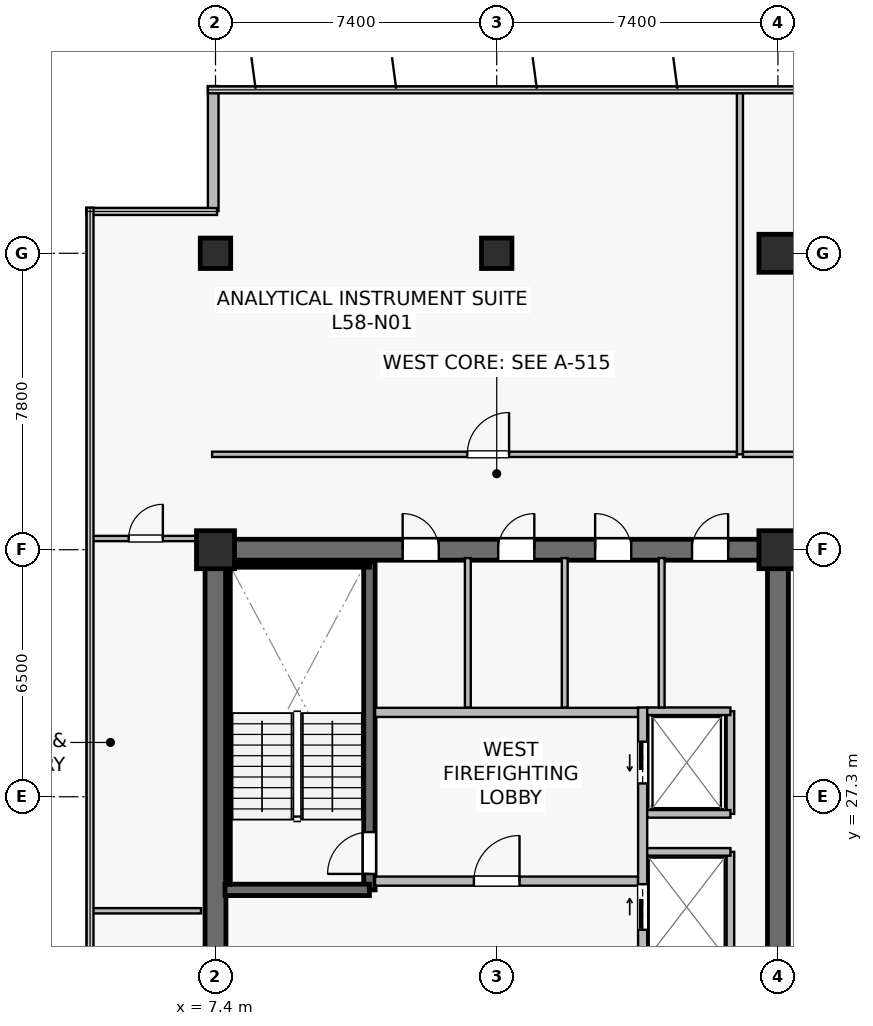
"""IFC4 building model, lengths in metres.
Left out: names, types, materials, properties, quantities, classifications, styles, units other than length and angle.
Written with IfcOpenShell. Run it as: python <this file> out.ifc"""

import sys

from ifc_helpers import new_model, si_unit, direction, frame, frame_2d, origin, origin_2d, place, context, subcontext, project, spatial, rectangle, extrude, source, transform, mapped, element, fill, save


model = new_model("IFC4")
c1 = context("Model", 3, precision=1e-05, world=origin(), true_north=direction((0.0, 1.0)))
c2 = subcontext(c1, "Body", "Model", "MODEL_VIEW")
j1 = project(units=[si_unit("LENGTHUNIT", "METRE"), si_unit("PLANEANGLEUNIT", "RADIAN")], contexts=[c1])
p1 = place(None, origin())
s1 = spatial("IfcSite", under=j1, at=p1, CompositionType="ELEMENT")
p2 = place(p1, origin())
s2 = spatial("IfcBuilding", under=s1, at=p2, CompositionType="ELEMENT")
p3 = place(p2, frame((0.0, 0.0, 242.4)))
s3 = spatial("IfcBuildingStorey", under=s2, at=p3, CompositionType="ELEMENT", Elevation=242.4)
p4 = place(p3, frame((7.125, 33.8, 0.0), z_axis=(0.0, 0.0, 1.0), x_axis=(1.0, 0.0, 0.0)))
e1 = element("IfcWall", 1, at=p4, inside=s3, PredefinedType="SHEAR", context=c2, shape_type="SweptSolid", body=[
    extrude(rectangle(XDim=15.35, YDim=0.55, at=frame_2d((7.675, 0.0))), origin(), (0.0, 0.0, 1.0), 3.8),
])
p5 = place(p4, frame((5.2, 0.0, 0.0)))
e2 = element("IfcOpeningElement", 2, at=p5, cuts=e1, PredefinedType="OPENING", context=c2, shape_type="SweptSolid", body=[
    extrude(rectangle(XDim=0.95, YDim=2.15, at=frame_2d((0.475, 1.075))), frame((0.0, 0.285, 0.0), z_axis=(0.0, -1.0, 0.0), x_axis=(1.0, 0.0, 0.0)), (0.0, 0.0, 1.0), 0.57),
])
p6 = place(p4, frame((7.715, 0.0, 0.0)))
e3 = element("IfcOpeningElement", 3, at=p6, cuts=e1, PredefinedType="OPENING", context=c2, shape_type="SweptSolid", body=[
    extrude(rectangle(XDim=0.95, YDim=2.15, at=frame_2d((0.475, 1.075))), frame((0.0, 0.285, 0.0), z_axis=(0.0, -1.0, 0.0), x_axis=(1.0, 0.0, 0.0)), (0.0, 0.0, 1.0), 0.57),
])
p7 = place(p4, frame((10.265, 0.0, 0.0)))
e4 = element("IfcOpeningElement", 4, at=p7, cuts=e1, PredefinedType="OPENING", context=c2, shape_type="SweptSolid", body=[
    extrude(rectangle(XDim=0.95, YDim=2.15, at=frame_2d((0.475, 1.075))), frame((0.0, 0.285, 0.0), z_axis=(0.0, -1.0, 0.0), x_axis=(1.0, 0.0, 0.0)), (0.0, 0.0, 1.0), 0.57),
])
p8 = place(p4, frame((12.815, 0.0, 0.0)))
e5 = element("IfcOpeningElement", 5, at=p8, cuts=e1, PredefinedType="OPENING", context=c2, shape_type="SweptSolid", body=[
    extrude(rectangle(XDim=0.95, YDim=2.15, at=frame_2d((0.475, 1.075))), frame((0.0, 0.285, 0.0), z_axis=(0.0, -1.0, 0.0), x_axis=(1.0, 0.0, 0.0)), (0.0, 0.0, 1.0), 0.57),
])
p9 = place(p3, frame((7.4, 15.075, 0.0), z_axis=(0.0, 0.0, 1.0), x_axis=(0.0, 1.0, 0.0)))
e6 = element("IfcWall", 6, at=p9, inside=s3, PredefinedType="SHEAR", context=c2, shape_type="SweptSolid", body=[
    extrude(rectangle(XDim=18.45, YDim=0.55, at=frame_2d((9.225, 0.0))), origin(), (0.0, 0.0, 1.0), 3.8),
])
p10 = place(p3, frame((22.2, 15.075, 0.0), z_axis=(0.0, 0.0, 1.0), x_axis=(0.0, 1.0, 0.0)))
e7 = element("IfcWall", 7, at=p10, inside=s3, PredefinedType="SHEAR", context=c2, shape_type="SweptSolid", body=[
    extrude(rectangle(XDim=18.45, YDim=0.55, at=frame_2d((9.225, 0.0))), origin(), (0.0, 0.0, 1.0), 3.8),
])
p11 = place(p10, frame((3.475, 0.0, 0.0)))
e8 = element("IfcOpeningElement", 8, at=p11, cuts=e7, PredefinedType="OPENING", context=c2, shape_type="SweptSolid", body=[
    extrude(rectangle(XDim=1.42, YDim=2.2, at=frame_2d((0.71, 1.1))), frame((0.0, 0.285, 0.0), z_axis=(0.0, -1.0, 0.0), x_axis=(1.0, 0.0, 0.0)), (0.0, 0.0, 1.0), 0.57),
])
p12 = place(p3, frame((11.45, 24.85, 0.0), z_axis=(0.0, 0.0, 1.0), x_axis=(0.0, 1.0, 0.0)))
e9 = element("IfcWall", 9, at=p12, inside=s3, PredefinedType="SHEAR", context=c2, shape_type="SweptSolid", body=[
    extrude(rectangle(XDim=8.63, YDim=0.3, at=frame_2d((4.315, 0.0))), origin(), (0.0, 0.0, 1.0), 3.8),
])
p13 = place(p12, frame((0.42, 0.0, 0.0)))
e10 = element("IfcOpeningElement", 10, at=p13, cuts=e9, PredefinedType="OPENING", context=c2, shape_type="SweptSolid", body=[
    extrude(rectangle(XDim=1.1, YDim=2.15, at=frame_2d((0.55, 1.075))), frame((0.0, 0.16, 0.0), z_axis=(0.0, -1.0, 0.0), x_axis=(1.0, 0.0, 0.0)), (0.0, 0.0, 1.0), 0.32),
])
p14 = place(p3, frame((7.65, 24.85, 0.0), z_axis=(0.0, 0.0, 1.0), x_axis=(1.0, 0.0, 0.0)))
e11 = element("IfcWall", 11, at=p14, inside=s3, PredefinedType="SHEAR", context=c2, shape_type="SweptSolid", body=[
    extrude(rectangle(XDim=3.8, YDim=0.3, at=frame_2d((1.9, 0.0))), origin(), (0.0, 0.0, 1.0), 3.8),
])
p15 = place(p3, frame((7.73, 33.4, 0.0), z_axis=(0.0, 0.0, 1.0), x_axis=(1.0, 0.0, 0.0)))
e12 = element("IfcWall", 12, at=p15, inside=s3, PredefinedType="SOLIDWALL", context=c2, shape_type="SweptSolid", body=[
    extrude(rectangle(XDim=3.72, YDim=0.12, at=frame_2d((1.86, 0.0))), origin(), (0.0, 0.0, 1.0), 3.8),
])
p16 = place(p3, frame((7.73, 25.0, 0.0), z_axis=(0.0, 0.0, 1.0), x_axis=(0.0, 1.0, 0.0)))
e13 = element("IfcWall", 13, at=p16, inside=s3, PredefinedType="SOLIDWALL", context=c2, shape_type="SweptSolid", body=[
    extrude(rectangle(XDim=8.32, YDim=0.12, at=frame_2d((4.16, 0.0))), origin(), (0.0, 0.0, 1.0), 3.8),
])
m1 = source(origin(), c2, "Body", "SweptSolid", [
    extrude(rectangle(XDim=1.0, YDim=1.0, at=origin_2d()), origin(), (0.0, 0.0, 1.0), 4.1),
])
for number, where, z_axis, x_axis in (
    (14, (7.4, 33.8, 0.0), (0.0, 0.0, 1.0), (1.0, 0.0, 0.0)),
    (15, (22.2, 33.8, 0.0), (0.0, 0.0, 1.0), (1.0, 0.0, 0.0)),
):
    element("IfcColumn", number, at=place(p3, frame(where, z_axis=z_axis, x_axis=x_axis)), inside=s3, PredefinedType="COLUMN", context=c2, shape_type="MappedRepresentation", body=[
        mapped(m1, transform((0.0, 0.0, 0.0), scale=1.0)),
    ])
m2 = source(origin(), c2, "Body", "SweptSolid", [
    extrude(rectangle(XDim=0.8, YDim=0.8, at=origin_2d()), origin(), (0.0, 0.0, 1.0), 4.1),
])
p17 = place(p3, frame((14.8, 41.6, 0.0), z_axis=(0.0, 0.0, 1.0), x_axis=(1.0, 0.0, 0.0)))
e16 = element("IfcColumn", 16, at=p17, inside=s3, PredefinedType="COLUMN", context=c2, shape_type="MappedRepresentation", body=[
    mapped(m2, transform((0.0, 0.0, 0.0), scale=1.0)),
])
p18 = place(p3, frame((22.2, 41.6, 0.0), z_axis=(0.0, 0.0, 1.0), x_axis=(1.0, 0.0, 0.0)))
e17 = element("IfcColumn", 17, at=p18, inside=s3, PredefinedType="COLUMN", context=c2, shape_type="MappedRepresentation", body=[
    mapped(m1, transform((0.0, 0.0, 0.0), scale=1.0)),
])
p19 = place(p3, frame((7.4, 41.6, 0.0), z_axis=(0.0, 0.0, 1.0), x_axis=(1.0, 0.0, 0.0)))
e18 = element("IfcColumn", 18, at=p19, inside=s3, PredefinedType="COLUMN", context=c2, shape_type="MappedRepresentation", body=[
    mapped(m2, transform((0.0, 0.0, 0.0), scale=1.0)),
])
p20 = place(p3, frame((7.34, 46.0, 0.0), z_axis=(0.0, 0.0, 1.0), x_axis=(0.0, -1.0, 0.0)))
e19 = element("IfcWall", 19, at=p20, inside=s3, PredefinedType="STANDARD", context=c2, shape_type="SweptSolid", body=[
    extrude(rectangle(XDim=3.288, YDim=0.28, at=frame_2d((1.644, 0.0))), origin(), (0.0, 0.0, 1.0), 3.8),
])
p21 = place(p3, frame((11.6, 25.08, 0.0), z_axis=(0.0, 0.0, 1.0), x_axis=(1.0, 0.0, 0.0)))
e20 = element("IfcWall", 20, at=p21, inside=s3, PredefinedType="SOLIDWALL", context=c2, shape_type="SweptSolid", body=[
    extrude(rectangle(XDim=6.92, YDim=0.24, at=frame_2d((3.46, 0.0))), origin(), (0.0, 0.0, 1.0), 3.197),
])
p22 = place(p21, frame((2.6, 0.0, 0.0)))
e21 = element("IfcOpeningElement", 21, at=p22, cuts=e20, PredefinedType="OPENING", context=c2, shape_type="SweptSolid", body=[
    extrude(rectangle(XDim=1.2, YDim=2.16, at=frame_2d((0.6, 1.08))), frame((0.0, 0.13, 0.0), z_axis=(0.0, -1.0, 0.0), x_axis=(1.0, 0.0, 0.0)), (0.0, 0.0, 1.0), 0.26),
])
p23 = place(p3, frame((11.6, 29.52, 0.0), z_axis=(0.0, 0.0, 1.0), x_axis=(1.0, 0.0, 0.0)))
e22 = element("IfcWall", 22, at=p23, inside=s3, PredefinedType="SOLIDWALL", context=c2, shape_type="SweptSolid", body=[
    extrude(rectangle(XDim=6.92, YDim=0.24, at=frame_2d((3.46, 0.0))), origin(), (0.0, 0.0, 1.0), 3.197),
])
p24 = place(p3, frame((18.64, 22.8, 0.0), z_axis=(0.0, 0.0, 1.0), x_axis=(0.0, 1.0, 0.0)))
e23 = element("IfcWall", 23, at=p24, inside=s3, PredefinedType="SOLIDWALL", context=c2, shape_type="SweptSolid", body=[
    extrude(rectangle(XDim=6.85, YDim=0.24, at=frame_2d((3.425, 0.0))), origin(), (0.0, 0.0, 1.0), 2.935),
])
p25 = place(p24, frame((4.85, 0.0, 0.0)))
e24 = element("IfcOpeningElement", 24, at=p25, cuts=e23, PredefinedType="OPENING", context=c2, shape_type="SweptSolid", body=[
    extrude(rectangle(XDim=1.1, YDim=2.22, at=frame_2d((0.55, 1.11))), frame((0.0, 0.13, 0.0), z_axis=(0.0, -1.0, 0.0), x_axis=(1.0, 0.0, 0.0)), (0.0, 0.0, 1.0), 0.26),
])
p26 = place(p24, frame((1.0, 0.0, 0.0)))
e25 = element("IfcOpeningElement", 25, at=p26, cuts=e23, PredefinedType="OPENING", context=c2, shape_type="SweptSolid", body=[
    extrude(rectangle(XDim=1.2, YDim=2.22, at=frame_2d((0.6, 1.11))), frame((0.0, 0.13, 0.0), z_axis=(0.0, -1.0, 0.0), x_axis=(1.0, 0.0, 0.0)), (0.0, 0.0, 1.0), 0.26),
])
p27 = place(p3, frame((20.95, 26.85, 0.0), z_axis=(0.0, 0.0, 1.0), x_axis=(0.0, 1.0, 0.0)))
e26 = element("IfcWall", 26, at=p27, inside=s3, PredefinedType="SOLIDWALL", context=c2, shape_type="SweptSolid", body=[
    extrude(rectangle(XDim=2.7, YDim=0.2, at=frame_2d((1.35, 0.0))), origin(), (0.0, 0.0, 1.0), 3.8),
])
p28 = place(p3, frame((18.76, 29.55, 0.0), z_axis=(0.0, 0.0, 1.0), x_axis=(1.0, 0.0, 0.0)))
e27 = element("IfcWall", 27, at=p28, inside=s3, PredefinedType="SOLIDWALL", context=c2, shape_type="SweptSolid", body=[
    extrude(rectangle(XDim=2.19, YDim=0.2, at=frame_2d((1.095, 0.0))), origin(), (0.0, 0.0, 1.0), 3.8),
])
p29 = place(p3, frame((18.76, 26.85, 0.0), z_axis=(0.0, 0.0, 1.0), x_axis=(1.0, 0.0, 0.0)))
e28 = element("IfcWall", 28, at=p29, inside=s3, PredefinedType="SOLIDWALL", context=c2, shape_type="SweptSolid", body=[
    extrude(rectangle(XDim=2.19, YDim=0.2, at=frame_2d((1.095, 0.0))), origin(), (0.0, 0.0, 1.0), 3.197),
])
p30 = place(p3, frame((20.95, 22.95, 0.0), z_axis=(0.0, 0.0, 1.0), x_axis=(0.0, 1.0, 0.0)))
e29 = element("IfcWall", 29, at=p30, inside=s3, PredefinedType="SOLIDWALL", context=c2, shape_type="SweptSolid", body=[
    extrude(rectangle(XDim=2.9, YDim=0.2, at=frame_2d((1.45, 0.0))), origin(), (0.0, 0.0, 1.0), 2.935),
])
p31 = place(p3, frame((18.76, 25.85, 0.0), z_axis=(0.0, 0.0, 1.0), x_axis=(1.0, 0.0, 0.0)))
e30 = element("IfcWall", 30, at=p31, inside=s3, PredefinedType="SOLIDWALL", context=c2, shape_type="SweptSolid", body=[
    extrude(rectangle(XDim=2.19, YDim=0.2, at=frame_2d((1.095, 0.0))), origin(), (0.0, 0.0, 1.0), 3.8),
])
for number, where, z_axis, x_axis in (
    (31, (14.04, 29.65, 0.0), (0.0, 0.0, 1.0), (0.0, 1.0, 0.0)),
    (32, (16.59, 29.65, 0.0), (0.0, 0.0, 1.0), (0.0, 1.0, 0.0)),
    (33, (19.14, 29.65, 0.0), (0.0, 0.0, 1.0), (0.0, 1.0, 0.0)),
):
    element("IfcWall", number, at=place(p3, frame(where, z_axis=z_axis, x_axis=x_axis)), inside=s3, PredefinedType="PLUMBINGWALL", context=c2, shape_type="SweptSolid", body=[
        extrude(rectangle(XDim=3.93, YDim=0.155, at=frame_2d((1.965, 0.0))), origin(), (0.0, 0.0, 1.0), 3.8),
    ])
p32 = place(p3, frame((7.31, 36.31, 0.0), z_axis=(0.0, 0.0, 1.0), x_axis=(1.0, 0.0, 0.0)))
e34 = element("IfcWall", 34, at=p32, inside=s3, PredefinedType="PARTITIONING", context=c2, shape_type="SweptSolid", body=[
    extrude(rectangle(XDim=13.81, YDim=0.14, at=frame_2d((6.905, 0.0))), origin(), (0.0, 0.0, 1.0), 3.197),
])
p33 = place(p32, frame((6.715, 0.0, 0.0)))
e35 = element("IfcOpeningElement", 35, at=p33, cuts=e34, PredefinedType="OPENING", context=c2, shape_type="SweptSolid", body=[
    extrude(rectangle(XDim=1.1, YDim=2.18, at=frame_2d((0.55, 1.09))), frame((0.0, 0.08, 0.0), z_axis=(0.0, -1.0, 0.0), x_axis=(1.0, 0.0, 0.0)), (0.0, 0.0, 1.0), 0.16),
])
p34 = place(p3, frame((21.2, 36.31, 0.0), z_axis=(0.0, 0.0, 1.0), x_axis=(0.0, 1.0, 0.0)))
e36 = element("IfcWall", 36, at=p34, inside=s3, PredefinedType="PARTITIONING", context=c2, shape_type="SweptSolid", body=[
    extrude(rectangle(XDim=9.58, YDim=0.16, at=frame_2d((4.79, 0.0))), origin(), (0.0, 0.0, 1.0), 3.135),
])
p35 = place(p3, frame((21.28, 36.31, 0.0), z_axis=(0.0, 0.0, 1.0), x_axis=(1.0, 0.0, 0.0)))
e37 = element("IfcWall", 37, at=p35, inside=s3, PredefinedType="PARTITIONING", context=c2, shape_type="SweptSolid", body=[
    extrude(rectangle(XDim=23.24, YDim=0.14, at=frame_2d((11.62, 0.0))), origin(), (0.0, 0.0, 1.0), 3.197),
])
p36 = place(p35, frame((9.14, 0.0, 0.0)))
e38 = element("IfcOpeningElement", 38, at=p36, cuts=e37, PredefinedType="OPENING", context=c2, shape_type="SweptSolid", body=[
    extrude(rectangle(XDim=1.1, YDim=2.18, at=frame_2d((0.55, 1.09))), frame((0.0, 0.08, 0.0), z_axis=(0.0, -1.0, 0.0), x_axis=(1.0, 0.0, 0.0)), (0.0, 0.0, 1.0), 0.16),
])
p37 = place(p3, frame((4.11, 24.3, 0.0), z_axis=(0.0, 0.0, 1.0), x_axis=(1.0, 0.0, 0.0)))
e39 = element("IfcWall", 39, at=p37, inside=s3, PredefinedType="PARTITIONING", context=c2, shape_type="SweptSolid", body=[
    extrude(rectangle(XDim=2.91, YDim=0.14, at=frame_2d((1.455, 0.0))), origin(), (0.0, 0.0, 1.0), 3.8),
])
p38 = place(p3, frame((4.11, 34.095, 0.0), z_axis=(0.0, 0.0, 1.0), x_axis=(1.0, 0.0, 0.0)))
e40 = element("IfcWall", 40, at=p38, inside=s3, PredefinedType="PARTITIONING", context=c2, shape_type="SweptSolid", body=[
    extrude(rectangle(XDim=2.91, YDim=0.14, at=frame_2d((1.455, 0.0))), origin(), (0.0, 0.0, 1.0), 3.8),
])
p39 = place(p38, frame((1.005, 0.0, 0.0)))
e41 = element("IfcOpeningElement", 41, at=p39, cuts=e40, PredefinedType="OPENING", context=c2, shape_type="SweptSolid", body=[
    extrude(rectangle(XDim=0.9, YDim=2.1, at=frame_2d((0.45, 1.05))), frame((0.0, 0.08, 0.0), z_axis=(0.0, -1.0, 0.0), x_axis=(1.0, 0.0, 0.0)), (0.0, 0.0, 1.0), 0.16),
])
m3 = source(origin(), c2, "Body", "SweptSolid", [
    extrude(rectangle(XDim=1.1, YDim=2.15, at=frame_2d((0.55, 1.075))), frame((0.0, 0.025, 0.0), z_axis=(0.0, -1.0, 0.0), x_axis=(1.0, 0.0, 0.0)), (0.0, 0.0, 1.0), 0.05),
])
p40 = place(p13, origin())
e42 = element("IfcDoor", 42, at=p40, inside=s3, OperationType="SINGLE_SWING_LEFT", PredefinedType="DOOR", context=c2, shape_type="MappedRepresentation", body=[
    mapped(m3, transform((0.0, 0.0, 0.0), scale=1.0)),
])
fill(e10, e42)
m4 = source(origin(), c2, "Body", "SweptSolid", [
    extrude(rectangle(XDim=1.2, YDim=2.16, at=frame_2d((0.6, 1.08))), frame((0.0, 0.025, 0.0), z_axis=(0.0, -1.0, 0.0), x_axis=(1.0, 0.0, 0.0)), (0.0, 0.0, 1.0), 0.05),
])
p41 = place(p22, origin())
e43 = element("IfcDoor", 43, at=p41, inside=s3, OperationType="SINGLE_SWING_RIGHT", PredefinedType="DOOR", context=c2, shape_type="MappedRepresentation", body=[
    mapped(m4, transform((0.0, 0.0, 0.0), scale=1.0)),
])
fill(e21, e43)
m5 = source(origin(), c2, "Body", "SweptSolid", [
    extrude(rectangle(XDim=1.1, YDim=2.22, at=frame_2d((0.55, 1.11))), frame((0.0, 0.025, 0.0), z_axis=(0.0, -1.0, 0.0), x_axis=(1.0, 0.0, 0.0)), (0.0, 0.0, 1.0), 0.05),
])
p42 = place(p25, origin())
e44 = element("IfcDoor", 44, at=p42, inside=s3, OperationType="SLIDING_TO_LEFT", PredefinedType="USERDEFINED", context=c2, shape_type="MappedRepresentation", body=[
    mapped(m5, transform((0.0, 0.0, 0.0), scale=1.0)),
])
fill(e24, e44)
m6 = source(origin(), c2, "Body", "SweptSolid", [
    extrude(rectangle(XDim=1.2, YDim=2.22, at=frame_2d((0.6, 1.11))), frame((0.0, 0.025, 0.0), z_axis=(0.0, -1.0, 0.0), x_axis=(1.0, 0.0, 0.0)), (0.0, 0.0, 1.0), 0.05),
])
p43 = place(p26, origin())
e45 = element("IfcDoor", 45, at=p43, inside=s3, OperationType="SLIDING_TO_RIGHT", PredefinedType="USERDEFINED", context=c2, shape_type="MappedRepresentation", body=[
    mapped(m6, transform((0.0, 0.0, 0.0), scale=1.0)),
])
fill(e25, e45)
m7 = source(origin(), c2, "Body", "SweptSolid", [
    extrude(rectangle(XDim=0.95, YDim=2.15, at=frame_2d((0.475, 1.075))), frame((0.0, 0.025, 0.0), z_axis=(0.0, -1.0, 0.0), x_axis=(1.0, 0.0, 0.0)), (0.0, 0.0, 1.0), 0.05),
])
p44 = place(p5, origin())
e46 = element("IfcDoor", 46, at=p44, inside=s3, OperationType="SINGLE_SWING_LEFT", PredefinedType="DOOR", context=c2, shape_type="MappedRepresentation", body=[
    mapped(m7, transform((0.0, 0.0, 0.0), scale=1.0)),
])
fill(e2, e46)
p45 = place(p6, origin())
e47 = element("IfcDoor", 47, at=p45, inside=s3, OperationType="SINGLE_SWING_RIGHT", PredefinedType="DOOR", context=c2, shape_type="MappedRepresentation", body=[
    mapped(m7, transform((0.0, 0.0, 0.0), scale=1.0)),
])
fill(e3, e47)
p46 = place(p7, origin())
e48 = element("IfcDoor", 48, at=p46, inside=s3, OperationType="SINGLE_SWING_LEFT", PredefinedType="DOOR", context=c2, shape_type="MappedRepresentation", body=[
    mapped(m7, transform((0.0, 0.0, 0.0), scale=1.0)),
])
fill(e4, e48)
p47 = place(p8, origin())
e49 = element("IfcDoor", 49, at=p47, inside=s3, OperationType="SINGLE_SWING_RIGHT", PredefinedType="DOOR", context=c2, shape_type="MappedRepresentation", body=[
    mapped(m7, transform((0.0, 0.0, 0.0), scale=1.0)),
])
fill(e5, e49)
m8 = source(origin(), c2, "Body", "SweptSolid", [
    extrude(rectangle(XDim=1.1, YDim=2.18, at=frame_2d((0.55, 1.09))), frame((0.0, 0.025, 0.0), z_axis=(0.0, -1.0, 0.0), x_axis=(1.0, 0.0, 0.0)), (0.0, 0.0, 1.0), 0.05),
])
p48 = place(p33, origin())
e50 = element("IfcDoor", 50, at=p48, inside=s3, OperationType="SINGLE_SWING_RIGHT", PredefinedType="DOOR", context=c2, shape_type="MappedRepresentation", body=[
    mapped(m8, transform((0.0, 0.0, 0.0), scale=1.0)),
])
fill(e35, e50)
m9 = source(origin(), c2, "Body", "SweptSolid", [
    extrude(rectangle(XDim=0.9, YDim=2.1, at=frame_2d((0.45, 1.05))), frame((0.0, 0.025, 0.0), z_axis=(0.0, -1.0, 0.0), x_axis=(1.0, 0.0, 0.0)), (0.0, 0.0, 1.0), 0.05),
])
p49 = place(p39, origin())
e51 = element("IfcDoor", 51, at=p49, inside=s3, OperationType="SINGLE_SWING_RIGHT", PredefinedType="DOOR", context=c2, shape_type="MappedRepresentation", body=[
    mapped(m9, transform((0.0, 0.0, 0.0), scale=1.0)),
])
fill(e41, e51)
save(model, sys.argv[1])
